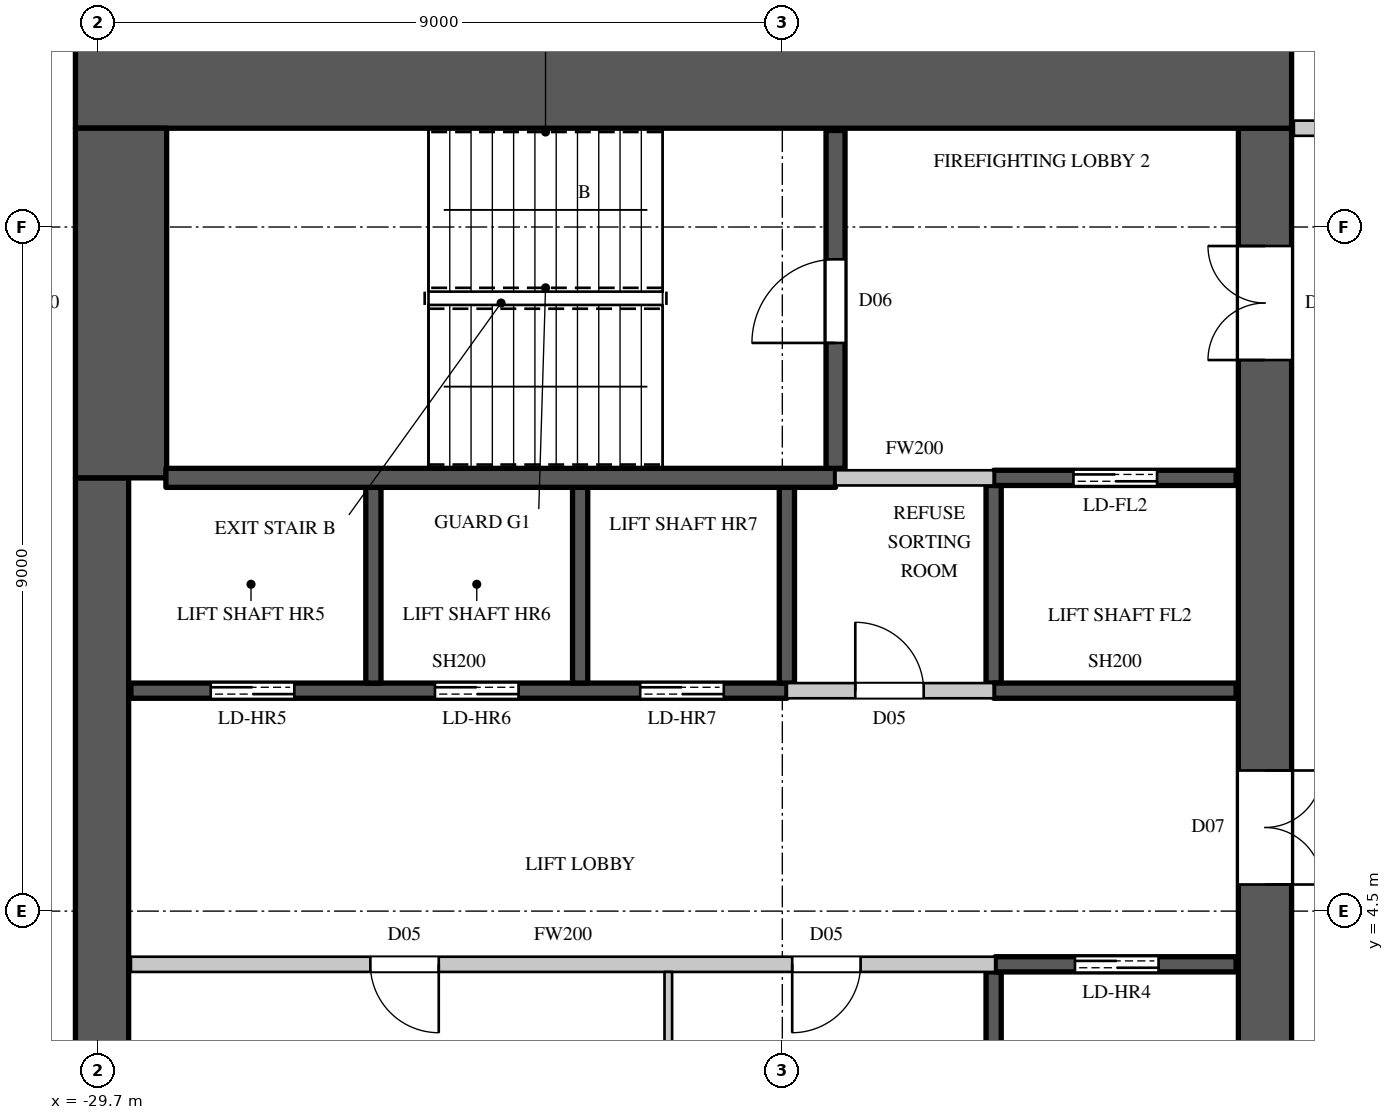
"""IFC4 building model, lengths in metres.
Left out: names, types, materials, properties, quantities, classifications, styles, units other than length and angle.
Written with IfcOpenShell. Run it as: python <this file> out.ifc"""

import sys

from ifc_helpers import new_model, si_unit, direction, frame, frame_2d, origin, place, context, subcontext, project, spatial, rectangle, extrude, element, fill, save


model = new_model("IFC4")
c1 = context("Model", 3, precision=1e-05, world=origin(), true_north=direction((0.0, 1.0)))
c2 = subcontext(c1, "Body", "Model", "MODEL_VIEW")
j1 = project(units=[si_unit("LENGTHUNIT", "METRE"), si_unit("PLANEANGLEUNIT", "RADIAN")], contexts=[c1])
p1 = place(None, origin())
s1 = spatial("IfcSite", under=j1, at=p1, CompositionType="ELEMENT")
p2 = place(p1, origin())
s2 = spatial("IfcBuilding", under=s1, at=p2, CompositionType="ELEMENT")
p3 = place(p2, frame((0.0, 0.0, 321.3)))
s3 = spatial("IfcBuildingStorey", under=s2, at=p3, CompositionType="ELEMENT", Elevation=321.3)
p4 = place(p3, frame((-30.0, 15.4, 0.0), z_axis=(0.0, 0.0, 1.0), x_axis=(1.0, 0.0, 0.0)))
e1 = element("IfcWall", 1, at=p4, inside=s3, PredefinedType="SHEAR", context=c2, shape_type="SweptSolid", body=[
    extrude(rectangle(XDim=16.0, YDim=1.2, at=frame_2d((8.0, 0.0))), origin(), (0.0, 0.0, 1.0), 4.1),
])
p5 = place(p3, frame((-14.35, -14.8, 0.0), z_axis=(0.0, 0.0, 1.0), x_axis=(0.0, 1.0, 0.0)))
e2 = element("IfcWall", 2, at=p5, inside=s3, PredefinedType="SHEAR", context=c2, shape_type="SweptSolid", body=[
    extrude(rectangle(XDim=29.6, YDim=0.7, at=frame_2d((14.8, 0.0))), origin(), (0.0, 0.0, 1.0), 4.1),
])
p6 = place(p5, frame((1.55, 0.0, 0.0)))
e3 = element("IfcOpeningElement", 3, at=p6, cuts=e2, PredefinedType="OPENING", context=c2, shape_type="SweptSolid", body=[
    extrude(rectangle(XDim=1.5, YDim=2.4, at=frame_2d((0.75, 1.2))), frame((0.0, 0.36, 0.0), z_axis=(0.0, -1.0, 0.0), x_axis=(1.0, 0.0, 0.0)), (0.0, 0.0, 1.0), 0.72),
])
p7 = place(p5, frame((26.55, 0.0, 0.0)))
e4 = element("IfcOpeningElement", 4, at=p7, cuts=e2, PredefinedType="OPENING", context=c2, shape_type="SweptSolid", body=[
    extrude(rectangle(XDim=1.5, YDim=2.4, at=frame_2d((0.75, 1.2))), frame((0.0, 0.36, 0.0), z_axis=(0.0, -1.0, 0.0), x_axis=(1.0, 0.0, 0.0)), (0.0, 0.0, 1.0), 0.72),
])
p8 = place(p5, frame((8.45, 0.0, 0.0)))
e5 = element("IfcOpeningElement", 5, at=p8, cuts=e2, PredefinedType="OPENING", context=c2, shape_type="SweptSolid", body=[
    extrude(rectangle(XDim=1.5, YDim=2.4, at=frame_2d((0.75, 1.2))), frame((0.0, 0.36, 0.0), z_axis=(0.0, -1.0, 0.0), x_axis=(1.0, 0.0, 0.0)), (0.0, 0.0, 1.0), 0.72),
])
p9 = place(p5, frame((19.65, 0.0, 0.0)))
e6 = element("IfcOpeningElement", 6, at=p9, cuts=e2, PredefinedType="OPENING", context=c2, shape_type="SweptSolid", body=[
    extrude(rectangle(XDim=1.5, YDim=2.4, at=frame_2d((0.75, 1.2))), frame((0.0, 0.36, 0.0), z_axis=(0.0, -1.0, 0.0), x_axis=(1.0, 0.0, 0.0)), (0.0, 0.0, 1.0), 0.72),
])
p10 = place(p5, frame((14.5, 0.0, 0.0)))
e7 = element("IfcOpeningElement", 7, at=p10, cuts=e2, PredefinedType="OPENING", context=c2, shape_type="SweptSolid", body=[
    extrude(rectangle(XDim=0.6, YDim=2.0, at=frame_2d((0.3, 1.0))), frame((0.0, 0.36, 0.0), z_axis=(0.0, -1.0, 0.0), x_axis=(1.0, 0.0, 0.0)), (0.0, 0.0, 1.0), 0.72),
])
p11 = place(p3, frame((-29.65, -10.2, 0.0), z_axis=(0.0, 0.0, 1.0), x_axis=(0.0, 1.0, 0.0)))
e8 = element("IfcWall", 8, at=p11, inside=s3, PredefinedType="SHEAR", context=c2, shape_type="SweptSolid", body=[
    extrude(rectangle(XDim=20.4, YDim=0.7, at=frame_2d((10.2, 0.0))), origin(), (0.0, 0.0, 1.0), 4.1),
])
p12 = place(p3, frame((-29.4, 10.2, 0.0), z_axis=(0.0, 0.0, 1.0), x_axis=(0.0, 1.0, 0.0)))
e9 = element("IfcWall", 9, at=p12, inside=s3, PredefinedType="SHEAR", context=c2, shape_type="SweptSolid", body=[
    extrude(rectangle(XDim=4.6, YDim=1.2, at=frame_2d((2.3, 0.0))), origin(), (0.0, 0.0, 1.0), 4.1),
])
p13 = place(p3, frame((-29.27, 3.8, 0.0), z_axis=(0.0, 0.0, 1.0), x_axis=(1.0, 0.0, 0.0)))
e10 = element("IfcWall", 10, at=p13, inside=s3, PredefinedType="PARTITIONING", context=c2, shape_type="SweptSolid", body=[
    extrude(rectangle(XDim=11.37, YDim=0.2, at=frame_2d((5.685, 0.0))), origin(), (0.0, 0.0, 1.0), 3.8),
])
p14 = place(p13, frame((3.15, 0.0, 0.0)))
e11 = element("IfcOpeningElement", 11, at=p14, cuts=e10, PredefinedType="OPENING", context=c2, shape_type="SweptSolid", body=[
    extrude(rectangle(XDim=0.9, YDim=2.2, at=frame_2d((0.45, 1.1))), frame((0.0, 0.11, 0.0), z_axis=(0.0, -1.0, 0.0), x_axis=(1.0, 0.0, 0.0)), (0.0, 0.0, 1.0), 0.22),
])
p15 = place(p13, frame((8.7, 0.0, 0.0)))
e12 = element("IfcOpeningElement", 12, at=p15, cuts=e10, PredefinedType="OPENING", context=c2, shape_type="SweptSolid", body=[
    extrude(rectangle(XDim=0.9, YDim=2.2, at=frame_2d((0.45, 1.1))), frame((0.0, 0.11, 0.0), z_axis=(0.0, -1.0, 0.0), x_axis=(1.0, 0.0, 0.0)), (0.0, 0.0, 1.0), 0.22),
])
p16 = place(p3, frame((-20.64, 7.4, 0.0), z_axis=(0.0, 0.0, 1.0), x_axis=(1.0, 0.0, 0.0)))
e13 = element("IfcWall", 13, at=p16, inside=s3, PredefinedType="PARTITIONING", context=c2, shape_type="SweptSolid", body=[
    extrude(rectangle(XDim=2.72, YDim=0.2, at=frame_2d((1.36, 0.0))), origin(), (0.0, 0.0, 1.0), 3.8),
])
p17 = place(p16, frame((0.9, 0.0, 0.0)))
e14 = element("IfcOpeningElement", 14, at=p17, cuts=e13, PredefinedType="OPENING", context=c2, shape_type="SweptSolid", body=[
    extrude(rectangle(XDim=0.9, YDim=2.2, at=frame_2d((0.45, 1.1))), frame((0.0, 0.11, 0.0), z_axis=(0.0, -1.0, 0.0), x_axis=(1.0, 0.0, 0.0)), (0.0, 0.0, 1.0), 0.22),
])
p18 = place(p3, frame((-20.0, 10.2, 0.0), z_axis=(0.0, 0.0, 1.0), x_axis=(1.0, 0.0, 0.0)))
e15 = element("IfcWall", 15, at=p18, inside=s3, PredefinedType="PARTITIONING", context=c2, shape_type="SweptSolid", body=[
    extrude(rectangle(XDim=2.08, YDim=0.2, at=frame_2d((1.04, 0.0))), origin(), (0.0, 0.0, 1.0), 3.8),
])
p19 = place(p3, frame((-13.97, 14.8, 0.0), z_axis=(0.0, 0.0, 1.0), x_axis=(1.0, 0.0, 0.0)))
e16 = element("IfcWall", 16, at=p19, inside=s3, PredefinedType="PARTITIONING", context=c2, shape_type="SweptSolid", body=[
    extrude(rectangle(XDim=3.07, YDim=0.2, at=frame_2d((1.535, 0.0))), origin(), (0.0, 0.0, 1.0), 3.8),
])
p20 = place(p3, frame((-29.27, 7.4, 0.0), z_axis=(0.0, 0.0, 1.0), x_axis=(1.0, 0.0, 0.0)))
e17 = element("IfcWall", 17, at=p20, inside=s3, PredefinedType="SHEAR", context=c2, shape_type="SweptSolid", body=[
    extrude(rectangle(XDim=8.63, YDim=0.2, at=frame_2d((4.315, 0.0))), origin(), (0.0, 0.0, 1.0), 3.8),
])
p21 = place(p20, frame((1.05, 0.0, 0.0)))
e18 = element("IfcOpeningElement", 18, at=p21, cuts=e17, PredefinedType="OPENING", context=c2, shape_type="SweptSolid", body=[
    extrude(rectangle(XDim=1.1, YDim=2.2, at=frame_2d((0.55, 1.1))), frame((0.0, 0.11, 0.0), z_axis=(0.0, -1.0, 0.0), x_axis=(1.0, 0.0, 0.0)), (0.0, 0.0, 1.0), 0.22),
])
p22 = place(p20, frame((4.0, 0.0, 0.0)))
e19 = element("IfcOpeningElement", 19, at=p22, cuts=e17, PredefinedType="OPENING", context=c2, shape_type="SweptSolid", body=[
    extrude(rectangle(XDim=1.1, YDim=2.2, at=frame_2d((0.55, 1.1))), frame((0.0, 0.11, 0.0), z_axis=(0.0, -1.0, 0.0), x_axis=(1.0, 0.0, 0.0)), (0.0, 0.0, 1.0), 0.22),
])
p23 = place(p20, frame((6.7, 0.0, 0.0)))
e20 = element("IfcOpeningElement", 20, at=p23, cuts=e17, PredefinedType="OPENING", context=c2, shape_type="SweptSolid", body=[
    extrude(rectangle(XDim=1.1, YDim=2.2, at=frame_2d((0.55, 1.1))), frame((0.0, 0.11, 0.0), z_axis=(0.0, -1.0, 0.0), x_axis=(1.0, 0.0, 0.0)), (0.0, 0.0, 1.0), 0.22),
])
for number, where, z_axis, x_axis in (
    (21, (-26.08, 7.5, 0.0), (0.0, 0.0, 1.0), (0.0, 1.0, 0.0)),
    (22, (-23.36, 7.5, 0.0), (0.0, 0.0, 1.0), (0.0, 1.0, 0.0)),
):
    element("IfcWall", number, at=place(p3, frame(where, z_axis=z_axis, x_axis=x_axis)), inside=s3, PredefinedType="SHEAR", context=c2, shape_type="SweptSolid", body=[
        extrude(rectangle(XDim=2.575, YDim=0.2, at=frame_2d((1.288, 0.0))), origin(), (0.0, 0.0, 1.0), 4.1),
    ])
p24 = place(p3, frame((-20.64, 7.5, 0.0), z_axis=(0.0, 0.0, 1.0), x_axis=(0.0, 1.0, 0.0)))
e23 = element("IfcWall", 23, at=p24, inside=s3, PredefinedType="SHEAR", context=c2, shape_type="SweptSolid", body=[
    extrude(rectangle(XDim=2.575, YDim=0.2, at=frame_2d((1.288, 0.0))), origin(), (0.0, 0.0, 1.0), 3.8),
])
p25 = place(p3, frame((-17.92, 1.1, 0.0), z_axis=(0.0, 0.0, 1.0), x_axis=(0.0, 1.0, 0.0)))
e24 = element("IfcWall", 24, at=p25, inside=s3, PredefinedType="SHEAR", context=c2, shape_type="SweptSolid", body=[
    extrude(rectangle(XDim=2.6, YDim=0.2, at=frame_2d((1.3, 0.0))), origin(), (0.0, 0.0, 1.0), 3.8),
])
p26 = place(p3, frame((-17.9, 3.8, 0.0), z_axis=(0.0, 0.0, 1.0), x_axis=(1.0, 0.0, 0.0)))
e25 = element("IfcWall", 25, at=p26, inside=s3, PredefinedType="SHEAR", context=c2, shape_type="SweptSolid", body=[
    extrude(rectangle(XDim=3.17, YDim=0.2, at=frame_2d((1.585, 0.0))), origin(), (0.0, 0.0, 1.0), 3.8),
])
p27 = place(p26, frame((1.05, 0.0, 0.0)))
e26 = element("IfcOpeningElement", 26, at=p27, cuts=e25, PredefinedType="OPENING", context=c2, shape_type="SweptSolid", body=[
    extrude(rectangle(XDim=1.1, YDim=2.2, at=frame_2d((0.55, 1.1))), frame((0.0, 0.11, 0.0), z_axis=(0.0, -1.0, 0.0), x_axis=(1.0, 0.0, 0.0)), (0.0, 0.0, 1.0), 0.22),
])
p28 = place(p3, frame((-17.92, 7.5, 0.0), z_axis=(0.0, 0.0, 1.0), x_axis=(0.0, 1.0, 0.0)))
e27 = element("IfcWall", 27, at=p28, inside=s3, PredefinedType="SHEAR", context=c2, shape_type="SweptSolid", body=[
    extrude(rectangle(XDim=2.6, YDim=0.2, at=frame_2d((1.3, 0.0))), origin(), (0.0, 0.0, 1.0), 3.8),
])
p29 = place(p3, frame((-17.92, 7.4, 0.0), z_axis=(0.0, 0.0, 1.0), x_axis=(1.0, 0.0, 0.0)))
e28 = element("IfcWall", 28, at=p29, inside=s3, PredefinedType="SHEAR", context=c2, shape_type="SweptSolid", body=[
    extrude(rectangle(XDim=3.19, YDim=0.2, at=frame_2d((1.595, 0.0))), origin(), (0.0, 0.0, 1.0), 3.8),
])
p30 = place(p3, frame((-17.92, 10.2, 0.0), z_axis=(0.0, 0.0, 1.0), x_axis=(1.0, 0.0, 0.0)))
e29 = element("IfcWall", 29, at=p30, inside=s3, PredefinedType="SHEAR", context=c2, shape_type="SweptSolid", body=[
    extrude(rectangle(XDim=3.19, YDim=0.2, at=frame_2d((1.595, 0.0))), origin(), (0.0, 0.0, 1.0), 3.8),
])
p31 = place(p30, frame((1.05, 0.0, 0.0)))
e30 = element("IfcOpeningElement", 30, at=p31, cuts=e29, PredefinedType="OPENING", context=c2, shape_type="SweptSolid", body=[
    extrude(rectangle(XDim=1.1, YDim=2.2, at=frame_2d((0.55, 1.1))), frame((0.0, 0.11, 0.0), z_axis=(0.0, -1.0, 0.0), x_axis=(1.0, 0.0, 0.0)), (0.0, 0.0, 1.0), 0.22),
])
p32 = place(p3, frame((-28.81, 10.2, 0.0), z_axis=(0.0, 0.0, 1.0), x_axis=(1.0, 0.0, 0.0)))
e31 = element("IfcWall", 31, at=p32, inside=s3, PredefinedType="SHEAR", context=c2, shape_type="SweptSolid", body=[
    extrude(rectangle(XDim=8.81, YDim=0.25, at=frame_2d((4.405, 0.0))), origin(), (0.0, 0.0, 1.0), 3.8),
])
p33 = place(p3, frame((-20.0, 10.325, 0.0), z_axis=(0.0, 0.0, 1.0), x_axis=(0.0, 1.0, 0.0)))
e32 = element("IfcWall", 32, at=p33, inside=s3, PredefinedType="SHEAR", context=c2, shape_type="SweptSolid", body=[
    extrude(rectangle(XDim=4.445, YDim=0.25, at=frame_2d((2.223, 0.0))), origin(), (0.0, 0.0, 1.0), 3.8),
])
p34 = place(p33, frame((1.65, 0.0, 0.0)))
e33 = element("IfcOpeningElement", 33, at=p34, cuts=e32, PredefinedType="OPENING", context=c2, shape_type="SweptSolid", body=[
    extrude(rectangle(XDim=1.1, YDim=2.2, at=frame_2d((0.55, 1.1))), frame((0.0, 0.135, 0.0), z_axis=(0.0, -1.0, 0.0), x_axis=(1.0, 0.0, 0.0)), (0.0, 0.0, 1.0), 0.27),
])
p35 = place(p3, frame((-22.2, 1.1, 0.0), z_axis=(0.0, 0.0, 1.0), x_axis=(0.0, 1.0, 0.0)))
e34 = element("IfcWall", 34, at=p35, inside=s3, PredefinedType="PARTITIONING", context=c2, shape_type="SweptSolid", body=[
    extrude(rectangle(XDim=2.6, YDim=0.1, at=frame_2d((1.3, 0.0))), origin(), (0.0, 0.0, 1.0), 3.8),
])
p36 = place(p34, origin())
e35 = element("IfcDoor", 35, at=p36, inside=s3, OperationType="SINGLE_SWING_LEFT", PredefinedType="DOOR", context=c2, shape_type="SweptSolid", body=[
    extrude(rectangle(XDim=1.1, YDim=2.2, at=frame_2d((0.55, 1.1))), frame((0.0, 0.025, 0.0), z_axis=(0.0, -1.0, 0.0), x_axis=(1.0, 0.0, 0.0)), (0.0, 0.0, 1.0), 0.05),
])
fill(e33, e35)
p37 = place(p14, origin())
e36 = element("IfcDoor", 36, at=p37, inside=s3, OperationType="SINGLE_SWING_LEFT", PredefinedType="DOOR", context=c2, shape_type="SweptSolid", body=[
    extrude(rectangle(XDim=0.9, YDim=2.2, at=frame_2d((0.45, 1.1))), frame((0.0, 0.025, 0.0), z_axis=(0.0, -1.0, 0.0), x_axis=(1.0, 0.0, 0.0)), (0.0, 0.0, 1.0), 0.05),
])
fill(e11, e36)
p38 = place(p15, origin())
e37 = element("IfcDoor", 37, at=p38, inside=s3, OperationType="SINGLE_SWING_RIGHT", PredefinedType="DOOR", context=c2, shape_type="SweptSolid", body=[
    extrude(rectangle(XDim=0.9, YDim=2.2, at=frame_2d((0.45, 1.1))), frame((0.0, 0.025, 0.0), z_axis=(0.0, -1.0, 0.0), x_axis=(1.0, 0.0, 0.0)), (0.0, 0.0, 1.0), 0.05),
])
fill(e12, e37)
p39 = place(p17, origin())
e38 = element("IfcDoor", 38, at=p39, inside=s3, OperationType="SINGLE_SWING_LEFT", PredefinedType="DOOR", context=c2, shape_type="SweptSolid", body=[
    extrude(rectangle(XDim=0.9, YDim=2.2, at=frame_2d((0.45, 1.1))), frame((0.0, 0.025, 0.0), z_axis=(0.0, -1.0, 0.0), x_axis=(1.0, 0.0, 0.0)), (0.0, 0.0, 1.0), 0.05),
])
fill(e14, e38)
p40 = place(p27, origin())
e39 = element("IfcDoor", 39, at=p40, inside=s3, OperationType="DOUBLE_DOOR_SLIDING", PredefinedType="DOOR", context=c2, shape_type="SweptSolid", body=[
    extrude(rectangle(XDim=1.1, YDim=2.2, at=frame_2d((0.55, 1.1))), frame((0.0, 0.025, 0.0), z_axis=(0.0, -1.0, 0.0), x_axis=(1.0, 0.0, 0.0)), (0.0, 0.0, 1.0), 0.05),
])
fill(e26, e39)
p41 = place(p21, origin())
e40 = element("IfcDoor", 40, at=p41, inside=s3, OperationType="DOUBLE_DOOR_SLIDING", PredefinedType="DOOR", context=c2, shape_type="SweptSolid", body=[
    extrude(rectangle(XDim=1.1, YDim=2.2, at=frame_2d((0.55, 1.1))), frame((0.0, 0.025, 0.0), z_axis=(0.0, -1.0, 0.0), x_axis=(1.0, 0.0, 0.0)), (0.0, 0.0, 1.0), 0.05),
])
fill(e18, e40)
p42 = place(p22, origin())
e41 = element("IfcDoor", 41, at=p42, inside=s3, OperationType="DOUBLE_DOOR_SLIDING", PredefinedType="DOOR", context=c2, shape_type="SweptSolid", body=[
    extrude(rectangle(XDim=1.1, YDim=2.2, at=frame_2d((0.55, 1.1))), frame((0.0, 0.025, 0.0), z_axis=(0.0, -1.0, 0.0), x_axis=(1.0, 0.0, 0.0)), (0.0, 0.0, 1.0), 0.05),
])
fill(e19, e41)
p43 = place(p23, origin())
e42 = element("IfcDoor", 42, at=p43, inside=s3, OperationType="DOUBLE_DOOR_SLIDING", PredefinedType="DOOR", context=c2, shape_type="SweptSolid", body=[
    extrude(rectangle(XDim=1.1, YDim=2.2, at=frame_2d((0.55, 1.1))), frame((0.0, 0.025, 0.0), z_axis=(0.0, -1.0, 0.0), x_axis=(1.0, 0.0, 0.0)), (0.0, 0.0, 1.0), 0.05),
])
fill(e20, e42)
p44 = place(p31, origin())
e43 = element("IfcDoor", 43, at=p44, inside=s3, OperationType="DOUBLE_DOOR_SLIDING", PredefinedType="DOOR", context=c2, shape_type="SweptSolid", body=[
    extrude(rectangle(XDim=1.1, YDim=2.2, at=frame_2d((0.55, 1.1))), frame((0.0, 0.025, 0.0), z_axis=(0.0, -1.0, 0.0), x_axis=(1.0, 0.0, 0.0)), (0.0, 0.0, 1.0), 0.05),
])
fill(e30, e43)
p45 = place(p7, origin())
e44 = element("IfcDoor", 44, at=p45, inside=s3, OperationType="DOUBLE_DOOR_SINGLE_SWING", PredefinedType="DOOR", context=c2, shape_type="SweptSolid", body=[
    extrude(rectangle(XDim=1.5, YDim=2.4, at=frame_2d((0.75, 1.2))), frame((0.0, 0.345, 0.0), z_axis=(0.0, -1.0, 0.0), x_axis=(1.0, 0.0, 0.0)), (0.0, 0.0, 1.0), 0.05),
])
fill(e4, e44)
p46 = place(p9, origin())
e45 = element("IfcDoor", 45, at=p46, inside=s3, OperationType="DOUBLE_DOOR_SINGLE_SWING", PredefinedType="DOOR", context=c2, shape_type="SweptSolid", body=[
    extrude(rectangle(XDim=1.5, YDim=2.4, at=frame_2d((0.75, 1.2))), frame((0.0, -0.295, 0.0), z_axis=(0.0, -1.0, 0.0), x_axis=(1.0, 0.0, 0.0)), (0.0, 0.0, 1.0), 0.05),
])
fill(e6, e45)
save(model, sys.argv[1])
